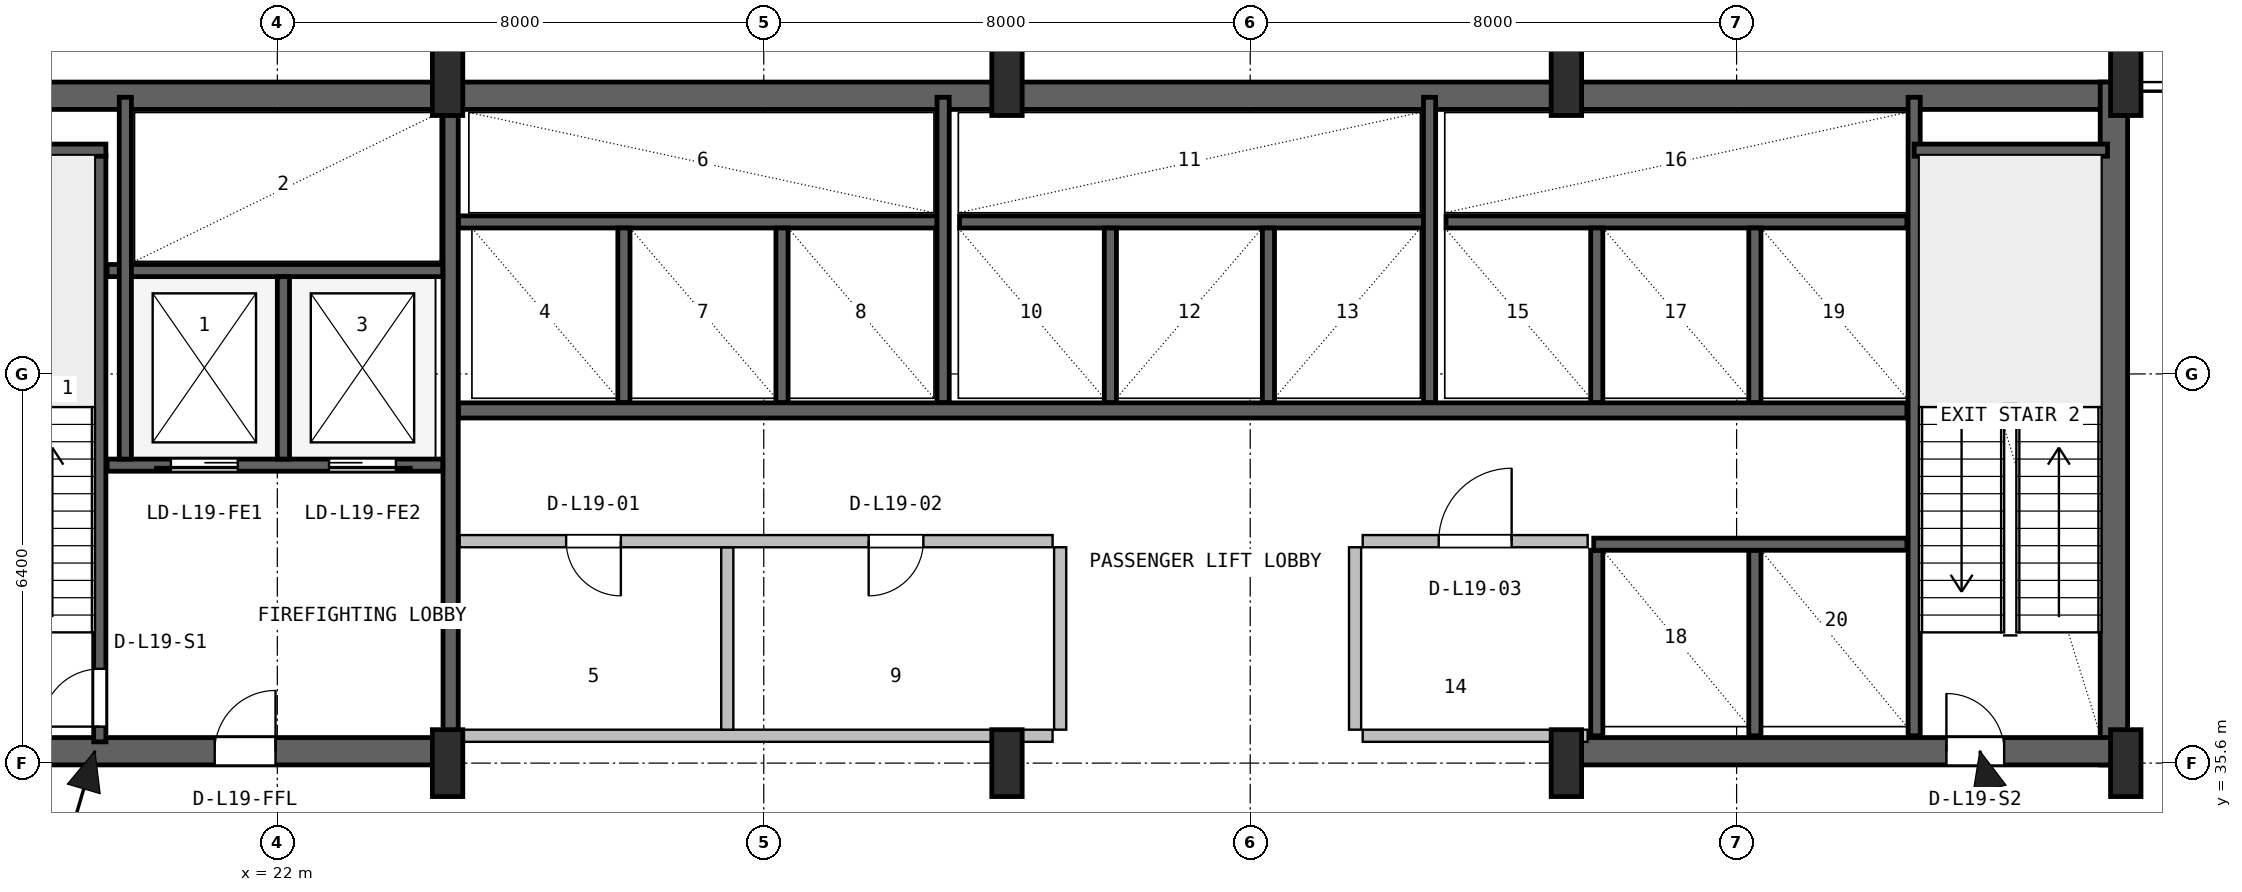
"""IFC4 building model, lengths in metres.
Left out: names, types, materials, properties, quantities, classifications, styles, units other than length and angle.
Written with IfcOpenShell. Run it as: python <this file> out.ifc"""

import sys

from ifc_helpers import new_model, si_unit, direction, frame, frame_2d, origin, origin_2d, place, context, subcontext, project, spatial, rectangle, i_section, extrude, source, transform, mapped, element, fill, save


model = new_model("IFC4")
c1 = context("Model", 3, precision=1e-05, world=origin(), true_north=direction((0.0, 1.0)))
c2 = subcontext(c1, "Body", "Model", "MODEL_VIEW")
j1 = project(units=[si_unit("LENGTHUNIT", "METRE"), si_unit("PLANEANGLEUNIT", "RADIAN")], contexts=[c1])
p1 = place(None, origin())
s1 = spatial("IfcSite", under=j1, at=p1, CompositionType="ELEMENT")
p2 = place(p1, origin())
s2 = spatial("IfcBuilding", under=s1, at=p2, CompositionType="ELEMENT")
p3 = place(p2, frame((0.0, 0.0, 82.2)))
s3 = spatial("IfcBuildingStorey", under=s2, at=p3, CompositionType="ELEMENT", Elevation=82.2)
p4 = place(p3, frame((15.6, 46.575, 0.0), z_axis=(0.0, 0.0, 1.0), x_axis=(1.0, 0.0, 0.0)))
e1 = element("IfcWall", 1, at=p4, inside=s3, PredefinedType="SHEAR", context=c2, shape_type="SweptSolid", body=[
    extrude(rectangle(XDim=36.8, YDim=0.45, at=frame_2d((18.4, 0.0))), origin(), (0.0, 0.0, 1.0), 4.55),
])
p5 = place(p3, frame((52.205, 35.57, 0.0), z_axis=(0.0, 0.0, 1.0), x_axis=(0.0, 1.0, 0.0)))
e2 = element("IfcWall", 2, at=p5, inside=s3, PredefinedType="SHEAR", context=c2, shape_type="SweptSolid", body=[
    extrude(rectangle(XDim=11.23, YDim=0.45, at=frame_2d((5.615, 0.0))), origin(), (0.0, 0.0, 1.0), 4.55),
])
p6 = place(p3, frame((15.57, 35.795, 0.0), z_axis=(0.0, 0.0, 1.0), x_axis=(1.0, 0.0, 0.0)))
e3 = element("IfcWall", 3, at=p6, inside=s3, PredefinedType="SHEAR", context=c2, shape_type="SweptSolid", body=[
    extrude(rectangle(XDim=9.23, YDim=0.45, at=frame_2d((4.615, 0.0))), origin(), (0.0, 0.0, 1.0), 4.55),
])
p7 = place(p6, frame((5.4, 0.0, 0.0)))
e4 = element("IfcOpeningElement", 4, at=p7, cuts=e3, PredefinedType="OPENING", context=c2, shape_type="SweptSolid", body=[
    extrude(rectangle(XDim=1.0, YDim=2.1, at=frame_2d((0.5, 1.05))), frame((0.0, 0.235, 0.0), z_axis=(0.0, -1.0, 0.0), x_axis=(1.0, 0.0, 0.0)), (0.0, 0.0, 1.0), 0.47),
])
p8 = place(p3, frame((43.2, 35.795, 0.0), z_axis=(0.0, 0.0, 1.0), x_axis=(1.0, 0.0, 0.0)))
e5 = element("IfcWall", 5, at=p8, inside=s3, PredefinedType="SHEAR", context=c2, shape_type="SweptSolid", body=[
    extrude(rectangle(XDim=9.23, YDim=0.45, at=frame_2d((4.615, 0.0))), origin(), (0.0, 0.0, 1.0), 4.55),
])
p9 = place(p8, frame((6.25, 0.0, 0.0)))
e6 = element("IfcOpeningElement", 6, at=p9, cuts=e5, PredefinedType="OPENING", context=c2, shape_type="SweptSolid", body=[
    extrude(rectangle(XDim=0.95, YDim=2.1, at=frame_2d((0.475, 1.05))), frame((0.0, 0.235, 0.0), z_axis=(0.0, -1.0, 0.0), x_axis=(1.0, 0.0, 0.0)), (0.0, 0.0, 1.0), 0.47),
])
m1 = source(origin(), c2, "Body", "SweptSolid", [
    extrude(i_section(OverallWidth=0.5, OverallDepth=1.1, WebThickness=0.018, FlangeThickness=0.032, FilletRadius=0.018, at=origin_2d()), origin(), (0.0, 0.0, 1.0), 4.8),
])
for number, where, z_axis, x_axis in (
    (7, (24.8, 35.6, 0.0), (0.0, 0.0, 1.0), (1.0, 0.0, 0.0)),
    (8, (24.8, 46.8, 0.0), (0.0, 0.0, 1.0), (1.0, 0.0, 0.0)),
    (9, (34.0, 35.6, 0.0), (0.0, 0.0, 1.0), (1.0, 0.0, 0.0)),
    (10, (34.0, 46.8, 0.0), (0.0, 0.0, 1.0), (1.0, 0.0, 0.0)),
    (11, (43.2, 35.6, 0.0), (0.0, 0.0, 1.0), (1.0, 0.0, 0.0)),
    (12, (43.2, 46.8, 0.0), (0.0, 0.0, 1.0), (1.0, 0.0, 0.0)),
    (13, (52.4, 35.6, 0.0), (0.0, 0.0, 1.0), (1.0, 0.0, 0.0)),
    (14, (52.4, 46.8, 0.0), (0.0, 0.0, 1.0), (1.0, 0.0, 0.0)),
):
    element("IfcColumn", number, at=place(p3, frame(where, z_axis=z_axis, x_axis=x_axis)), inside=s3, PredefinedType="COLUMN", context=c2, shape_type="MappedRepresentation", body=[
        mapped(m1, transform((0.0, 0.0, 0.0), x_axis=(1.0, 0.0, 0.0), y_axis=(0.0, 1.0, 0.0), z_axis=(0.0, 0.0, 1.0), scale=1.0)),
    ])
p10 = place(p3, frame((19.08, 35.95, 0.0), z_axis=(0.0, 0.0, 1.0), x_axis=(0.0, 1.0, 0.0)))
e15 = element("IfcWall", 15, at=p10, inside=s3, PredefinedType="SHEAR", context=c2, shape_type="SweptSolid", body=[
    extrude(rectangle(XDim=9.65, YDim=0.2, at=frame_2d((4.825, 0.0))), origin(), (0.0, 0.0, 1.0), 4.55),
])
p11 = place(p10, frame((0.25, 0.0, 0.0)))
e16 = element("IfcOpeningElement", 16, at=p11, cuts=e15, PredefinedType="OPENING", context=c2, shape_type="SweptSolid", body=[
    extrude(rectangle(XDim=0.95, YDim=2.1, at=frame_2d((0.475, 1.05))), frame((0.0, 0.11, 0.0), z_axis=(0.0, -1.0, 0.0), x_axis=(1.0, 0.0, 0.0)), (0.0, 0.0, 1.0), 0.22),
])
p12 = place(p3, frame((15.95, 45.68, 0.0), z_axis=(0.0, 0.0, 1.0), x_axis=(1.0, 0.0, 0.0)))
e17 = element("IfcWall", 17, at=p12, inside=s3, PredefinedType="SHEAR", context=c2, shape_type="SweptSolid", body=[
    extrude(rectangle(XDim=3.23, YDim=0.2, at=frame_2d((1.615, 0.0))), origin(), (0.0, 0.0, 1.0), 4.55),
])
p13 = place(p3, frame((24.85, 36.05, 0.0), z_axis=(0.0, 0.0, 1.0), x_axis=(0.0, 1.0, 0.0)))
e18 = element("IfcWall", 18, at=p13, inside=s3, PredefinedType="SHEAR", context=c2, shape_type="SweptSolid", body=[
    extrude(rectangle(XDim=10.45, YDim=0.25, at=frame_2d((5.225, 0.0))), origin(), (0.0, 0.0, 1.0), 4.55),
])
p14 = place(p3, frame((19.2, 40.5, 0.0), z_axis=(0.0, 0.0, 1.0), x_axis=(1.0, 0.0, 0.0)))
e19 = element("IfcWall", 19, at=p14, inside=s3, PredefinedType="SHEAR", context=c2, shape_type="SweptSolid", body=[
    extrude(rectangle(XDim=5.52, YDim=0.2, at=frame_2d((2.76, 0.0))), origin(), (0.0, 0.0, 1.0), 4.55),
])
p15 = place(p14, frame((1.05, 0.0, 0.0)))
e20 = element("IfcOpeningElement", 20, at=p15, cuts=e19, PredefinedType="OPENING", context=c2, shape_type="SweptSolid", body=[
    extrude(rectangle(XDim=1.1, YDim=2.18, at=frame_2d((0.55, 1.09))), frame((0.0, 0.11, 0.0), z_axis=(0.0, -1.0, 0.0), x_axis=(1.0, 0.0, 0.0)), (0.0, 0.0, 1.0), 0.22),
])
p16 = place(p14, frame((3.65, 0.0, 0.0)))
e21 = element("IfcOpeningElement", 21, at=p16, cuts=e19, PredefinedType="OPENING", context=c2, shape_type="SweptSolid", body=[
    extrude(rectangle(XDim=1.1, YDim=2.18, at=frame_2d((0.55, 1.09))), frame((0.0, 0.11, 0.0), z_axis=(0.0, -1.0, 0.0), x_axis=(1.0, 0.0, 0.0)), (0.0, 0.0, 1.0), 0.22),
])
p17 = place(p3, frame((19.2, 43.7, 0.0), z_axis=(0.0, 0.0, 1.0), x_axis=(1.0, 0.0, 0.0)))
e22 = element("IfcWall", 22, at=p17, inside=s3, PredefinedType="SHEAR", context=c2, shape_type="SweptSolid", body=[
    extrude(rectangle(XDim=5.52, YDim=0.2, at=frame_2d((2.76, 0.0))), origin(), (0.0, 0.0, 1.0), 4.55),
])
p18 = place(p3, frame((22.1, 40.6, 0.0), z_axis=(0.0, 0.0, 1.0), x_axis=(0.0, 1.0, 0.0)))
e23 = element("IfcWall", 23, at=p18, inside=s3, PredefinedType="SHEAR", context=c2, shape_type="SweptSolid", body=[
    extrude(rectangle(XDim=3.0, YDim=0.2, at=frame_2d((1.5, 0.0))), origin(), (0.0, 0.0, 1.0), 4.55),
])
p19 = place(p3, frame((19.5, 40.6, 0.0), z_axis=(0.0, 0.0, 1.0), x_axis=(0.0, 1.0, 0.0)))
e24 = element("IfcWall", 24, at=p19, inside=s3, PredefinedType="SHEAR", context=c2, shape_type="SweptSolid", body=[
    extrude(rectangle(XDim=5.95, YDim=0.2, at=frame_2d((2.975, 0.0))), origin(), (0.0, 0.0, 1.0), 4.55),
])
p20 = place(p3, frame((48.92, 36.05, 0.0), z_axis=(0.0, 0.0, 1.0), x_axis=(0.0, 1.0, 0.0)))
e25 = element("IfcWall", 25, at=p20, inside=s3, PredefinedType="SHEAR", context=c2, shape_type="SweptSolid", body=[
    extrude(rectangle(XDim=10.5, YDim=0.2, at=frame_2d((5.25, 0.0))), origin(), (0.0, 0.0, 1.0), 4.55),
])
p21 = place(p3, frame((48.92, 45.68, 0.0), z_axis=(0.0, 0.0, 1.0), x_axis=(1.0, 0.0, 0.0)))
e26 = element("IfcWall", 26, at=p21, inside=s3, PredefinedType="SHEAR", context=c2, shape_type="SweptSolid", body=[
    extrude(rectangle(XDim=3.18, YDim=0.2, at=frame_2d((1.59, 0.0))), origin(), (0.0, 0.0, 1.0), 4.55),
])
p22 = place(p3, frame((24.98, 41.4, 0.0), z_axis=(0.0, 0.0, 1.0), x_axis=(1.0, 0.0, 0.0)))
e27 = element("IfcWall", 27, at=p22, inside=s3, PredefinedType="SHEAR", context=c2, shape_type="SweptSolid", body=[
    extrude(rectangle(XDim=23.82, YDim=0.25, at=frame_2d((11.91, 0.0))), origin(), (0.0, 0.0, 1.0), 4.55),
])
p23 = place(p3, frame((24.98, 44.5, 0.0), z_axis=(0.0, 0.0, 1.0), x_axis=(1.0, 0.0, 0.0)))
e28 = element("IfcWall", 28, at=p23, inside=s3, PredefinedType="SHEAR", context=c2, shape_type="SweptSolid", body=[
    extrude(rectangle(XDim=7.87, YDim=0.2, at=frame_2d((3.935, 0.0))), origin(), (0.0, 0.0, 1.0), 4.55),
])
for number, where, z_axis, x_axis in (
    (29, (27.7, 41.53, 0.0), (0.0, 0.0, 1.0), (0.0, 1.0, 0.0)),
    (30, (30.3, 41.53, 0.0), (0.0, 0.0, 1.0), (0.0, 1.0, 0.0)),
):
    element("IfcWall", number, at=place(p3, frame(where, z_axis=z_axis, x_axis=x_axis)), inside=s3, PredefinedType="SHEAR", context=c2, shape_type="SweptSolid", body=[
        extrude(rectangle(XDim=2.87, YDim=0.2, at=frame_2d((1.435, 0.0))), origin(), (0.0, 0.0, 1.0), 4.55),
    ])
p24 = place(p3, frame((32.95, 41.53, 0.0), z_axis=(0.0, 0.0, 1.0), x_axis=(0.0, 1.0, 0.0)))
e31 = element("IfcWall", 31, at=p24, inside=s3, PredefinedType="SHEAR", context=c2, shape_type="SweptSolid", body=[
    extrude(rectangle(XDim=5.02, YDim=0.2, at=frame_2d((2.51, 0.0))), origin(), (0.0, 0.0, 1.0), 4.55),
])
p25 = place(p3, frame((33.22, 44.5, 0.0), z_axis=(0.0, 0.0, 1.0), x_axis=(1.0, 0.0, 0.0)))
e32 = element("IfcWall", 32, at=p25, inside=s3, PredefinedType="SHEAR", context=c2, shape_type="SweptSolid", body=[
    extrude(rectangle(XDim=7.63, YDim=0.2, at=frame_2d((3.815, 0.0))), origin(), (0.0, 0.0, 1.0), 4.55),
])
for number, where, z_axis, x_axis in (
    (33, (35.7, 41.53, 0.0), (0.0, 0.0, 1.0), (0.0, 1.0, 0.0)),
    (34, (38.3, 41.53, 0.0), (0.0, 0.0, 1.0), (0.0, 1.0, 0.0)),
):
    element("IfcWall", number, at=place(p3, frame(where, z_axis=z_axis, x_axis=x_axis)), inside=s3, PredefinedType="SHEAR", context=c2, shape_type="SweptSolid", body=[
        extrude(rectangle(XDim=2.87, YDim=0.2, at=frame_2d((1.435, 0.0))), origin(), (0.0, 0.0, 1.0), 4.55),
    ])
p26 = place(p3, frame((40.95, 41.53, 0.0), z_axis=(0.0, 0.0, 1.0), x_axis=(0.0, 1.0, 0.0)))
e35 = element("IfcWall", 35, at=p26, inside=s3, PredefinedType="SHEAR", context=c2, shape_type="SweptSolid", body=[
    extrude(rectangle(XDim=5.02, YDim=0.2, at=frame_2d((2.51, 0.0))), origin(), (0.0, 0.0, 1.0), 4.55),
])
p27 = place(p3, frame((41.22, 44.5, 0.0), z_axis=(0.0, 0.0, 1.0), x_axis=(1.0, 0.0, 0.0)))
e36 = element("IfcWall", 36, at=p27, inside=s3, PredefinedType="SHEAR", context=c2, shape_type="SweptSolid", body=[
    extrude(rectangle(XDim=7.58, YDim=0.2, at=frame_2d((3.79, 0.0))), origin(), (0.0, 0.0, 1.0), 4.55),
])
for number, where, z_axis, x_axis in (
    (37, (43.7, 41.53, 0.0), (0.0, 0.0, 1.0), (0.0, 1.0, 0.0)),
    (38, (46.3, 41.53, 0.0), (0.0, 0.0, 1.0), (0.0, 1.0, 0.0)),
):
    element("IfcWall", number, at=place(p3, frame(where, z_axis=z_axis, x_axis=x_axis)), inside=s3, PredefinedType="SHEAR", context=c2, shape_type="SweptSolid", body=[
        extrude(rectangle(XDim=2.87, YDim=0.2, at=frame_2d((1.435, 0.0))), origin(), (0.0, 0.0, 1.0), 4.55),
    ])
for number, where, z_axis, x_axis in (
    (39, (43.7, 36.05, 0.0), (0.0, 0.0, 1.0), (0.0, 1.0, 0.0)),
    (40, (46.3, 36.05, 0.0), (0.0, 0.0, 1.0), (0.0, 1.0, 0.0)),
):
    element("IfcWall", number, at=place(p3, frame(where, z_axis=z_axis, x_axis=x_axis)), inside=s3, PredefinedType="SHEAR", context=c2, shape_type="SweptSolid", body=[
        extrude(rectangle(XDim=3.05, YDim=0.2, at=frame_2d((1.525, 0.0))), origin(), (0.0, 0.0, 1.0), 4.55),
    ])
p28 = place(p3, frame((43.65, 39.2, 0.0), z_axis=(0.0, 0.0, 1.0), x_axis=(1.0, 0.0, 0.0)))
e41 = element("IfcWall", 41, at=p28, inside=s3, PredefinedType="SHEAR", context=c2, shape_type="SweptSolid", body=[
    extrude(rectangle(XDim=5.15, YDim=0.2, at=frame_2d((2.575, 0.0))), origin(), (0.0, 0.0, 1.0), 4.55),
])
p29 = place(p3, frame((25.0, 36.05, 0.0), z_axis=(0.0, 0.0, 1.0), x_axis=(1.0, 0.0, 0.0)))
e42 = element("IfcWall", 42, at=p29, inside=s3, PredefinedType="SOLIDWALL", context=c2, shape_type="SweptSolid", body=[
    extrude(rectangle(XDim=9.75, YDim=0.2, at=frame_2d((4.875, 0.0))), origin(), (0.0, 0.0, 1.0), 4.53),
])
p30 = place(p3, frame((29.4, 36.15, 0.0), z_axis=(0.0, 0.0, 1.0), x_axis=(0.0, 1.0, 0.0)))
e43 = element("IfcWall", 43, at=p30, inside=s3, PredefinedType="SOLIDWALL", context=c2, shape_type="SweptSolid", body=[
    extrude(rectangle(XDim=3.0, YDim=0.2, at=frame_2d((1.5, 0.0))), origin(), (0.0, 0.0, 1.0), 4.53),
])
p31 = place(p3, frame((25.0, 39.25, 0.0), z_axis=(0.0, 0.0, 1.0), x_axis=(1.0, 0.0, 0.0)))
e44 = element("IfcWall", 44, at=p31, inside=s3, PredefinedType="SOLIDWALL", context=c2, shape_type="SweptSolid", body=[
    extrude(rectangle(XDim=9.75, YDim=0.2, at=frame_2d((4.875, 0.0))), origin(), (0.0, 0.0, 1.0), 4.53),
])
p32 = place(p31, frame((1.75, 0.0, 0.0)))
e45 = element("IfcOpeningElement", 45, at=p32, cuts=e44, PredefinedType="OPENING", context=c2, shape_type="SweptSolid", body=[
    extrude(rectangle(XDim=0.9, YDim=2.06, at=frame_2d((0.45, 1.03))), frame((0.0, 0.11, 0.0), z_axis=(0.0, -1.0, 0.0), x_axis=(1.0, 0.0, 0.0)), (0.0, 0.0, 1.0), 0.22),
])
p33 = place(p31, frame((6.725, 0.0, 0.0)))
e46 = element("IfcOpeningElement", 46, at=p33, cuts=e44, PredefinedType="OPENING", context=c2, shape_type="SweptSolid", body=[
    extrude(rectangle(XDim=0.9, YDim=2.06, at=frame_2d((0.45, 1.03))), frame((0.0, 0.11, 0.0), z_axis=(0.0, -1.0, 0.0), x_axis=(1.0, 0.0, 0.0)), (0.0, 0.0, 1.0), 0.22),
])
p34 = place(p3, frame((34.875, 36.15, 0.0), z_axis=(0.0, 0.0, 1.0), x_axis=(0.0, 1.0, 0.0)))
e47 = element("IfcWall", 47, at=p34, inside=s3, PredefinedType="SOLIDWALL", context=c2, shape_type="SweptSolid", body=[
    extrude(rectangle(XDim=3.0, YDim=0.2, at=frame_2d((1.5, 0.0))), origin(), (0.0, 0.0, 1.0), 4.53),
])
p35 = place(p3, frame((39.85, 36.05, 0.0), z_axis=(0.0, 0.0, 1.0), x_axis=(1.0, 0.0, 0.0)))
e48 = element("IfcWall", 48, at=p35, inside=s3, PredefinedType="SOLIDWALL", context=c2, shape_type="SweptSolid", body=[
    extrude(rectangle(XDim=3.7, YDim=0.2, at=frame_2d((1.85, 0.0))), origin(), (0.0, 0.0, 1.0), 4.53),
])
p36 = place(p3, frame((39.85, 39.25, 0.0), z_axis=(0.0, 0.0, 1.0), x_axis=(1.0, 0.0, 0.0)))
e49 = element("IfcWall", 49, at=p36, inside=s3, PredefinedType="SOLIDWALL", context=c2, shape_type="SweptSolid", body=[
    extrude(rectangle(XDim=3.7, YDim=0.2, at=frame_2d((1.85, 0.0))), origin(), (0.0, 0.0, 1.0), 4.53),
])
p37 = place(p36, frame((1.25, 0.0, 0.0)))
e50 = element("IfcOpeningElement", 50, at=p37, cuts=e49, PredefinedType="OPENING", context=c2, shape_type="SweptSolid", body=[
    extrude(rectangle(XDim=1.2, YDim=2.1, at=frame_2d((0.6, 1.05))), frame((0.0, 0.11, 0.0), z_axis=(0.0, -1.0, 0.0), x_axis=(1.0, 0.0, 0.0)), (0.0, 0.0, 1.0), 0.22),
])
p38 = place(p3, frame((39.725, 36.15, 0.0), z_axis=(0.0, 0.0, 1.0), x_axis=(0.0, 1.0, 0.0)))
e51 = element("IfcWall", 51, at=p38, inside=s3, PredefinedType="SOLIDWALL", context=c2, shape_type="SweptSolid", body=[
    extrude(rectangle(XDim=3.0, YDim=0.2, at=frame_2d((1.5, 0.0))), origin(), (0.0, 0.0, 1.0), 4.53),
])
m2 = source(origin(), c2, "Body", "SweptSolid", [
    extrude(rectangle(XDim=0.95, YDim=2.1, at=frame_2d((0.475, 1.05))), frame((0.0, 0.025, 0.0), z_axis=(0.0, -1.0, 0.0), x_axis=(1.0, 0.0, 0.0)), (0.0, 0.0, 1.0), 0.05),
])
p39 = place(p11, origin())
e52 = element("IfcDoor", 52, at=p39, inside=s3, OperationType="SINGLE_SWING_LEFT", PredefinedType="DOOR", context=c2, shape_type="MappedRepresentation", body=[
    mapped(m2, transform((0.0, 0.0, 0.0), x_axis=(1.0, 0.0, 0.0), y_axis=(0.0, 1.0, 0.0), z_axis=(0.0, 0.0, 1.0), scale=1.0)),
])
fill(e16, e52)
m3 = source(origin(), c2, "Body", "SweptSolid", [
    extrude(rectangle(XDim=1.0, YDim=2.1, at=frame_2d((0.5, 1.05))), frame((0.0, 0.025, 0.0), z_axis=(0.0, -1.0, 0.0), x_axis=(1.0, 0.0, 0.0)), (0.0, 0.0, 1.0), 0.05),
])
p40 = place(p7, origin())
e53 = element("IfcDoor", 53, at=p40, inside=s3, OperationType="SINGLE_SWING_RIGHT", PredefinedType="DOOR", context=c2, shape_type="MappedRepresentation", body=[
    mapped(m3, transform((0.0, 0.0, 0.0), x_axis=(1.0, 0.0, 0.0), y_axis=(0.0, 1.0, 0.0), z_axis=(0.0, 0.0, 1.0), scale=1.0)),
])
fill(e4, e53)
m4 = source(origin(), c2, "Body", "SweptSolid", [
    extrude(rectangle(XDim=1.1, YDim=2.18, at=frame_2d((0.55, 1.09))), frame((0.0, 0.025, 0.0), z_axis=(0.0, -1.0, 0.0), x_axis=(1.0, 0.0, 0.0)), (0.0, 0.0, 1.0), 0.05),
])
p41 = place(p15, frame((1.1, 0.0, 0.0), z_axis=(0.0, 0.0, 1.0), x_axis=(-1.0, 0.0, 0.0)))
e54 = element("IfcDoor", 54, at=p41, inside=s3, OperationType="SLIDING_TO_LEFT", PredefinedType="DOOR", context=c2, shape_type="MappedRepresentation", body=[
    mapped(m4, transform((0.0, 0.0, 0.0), x_axis=(1.0, 0.0, 0.0), y_axis=(0.0, 1.0, 0.0), z_axis=(0.0, 0.0, 1.0), scale=1.0)),
])
fill(e20, e54)
p42 = place(p16, frame((1.1, 0.0, 0.0), z_axis=(0.0, 0.0, 1.0), x_axis=(-1.0, 0.0, 0.0)))
e55 = element("IfcDoor", 55, at=p42, inside=s3, OperationType="SLIDING_TO_RIGHT", PredefinedType="DOOR", context=c2, shape_type="MappedRepresentation", body=[
    mapped(m4, transform((0.0, 0.0, 0.0), x_axis=(1.0, 0.0, 0.0), y_axis=(0.0, 1.0, 0.0), z_axis=(0.0, 0.0, 1.0), scale=1.0)),
])
fill(e21, e55)
p43 = place(p9, origin())
e56 = element("IfcDoor", 56, at=p43, inside=s3, OperationType="SINGLE_SWING_LEFT", PredefinedType="DOOR", context=c2, shape_type="MappedRepresentation", body=[
    mapped(m2, transform((0.0, 0.0, 0.0), x_axis=(1.0, 0.0, 0.0), y_axis=(0.0, 1.0, 0.0), z_axis=(0.0, 0.0, 1.0), scale=1.0)),
])
fill(e6, e56)
m5 = source(origin(), c2, "Body", "SweptSolid", [
    extrude(rectangle(XDim=0.9, YDim=2.06, at=frame_2d((0.45, 1.03))), frame((0.0, 0.025, 0.0), z_axis=(0.0, -1.0, 0.0), x_axis=(1.0, 0.0, 0.0)), (0.0, 0.0, 1.0), 0.05),
])
p44 = place(p32, frame((0.9, 0.0, 0.0), z_axis=(0.0, 0.0, 1.0), x_axis=(-1.0, 0.0, 0.0)))
e57 = element("IfcDoor", 57, at=p44, inside=s3, OperationType="SINGLE_SWING_RIGHT", PredefinedType="DOOR", context=c2, shape_type="MappedRepresentation", body=[
    mapped(m5, transform((0.0, 0.0, 0.0), x_axis=(1.0, 0.0, 0.0), y_axis=(0.0, 1.0, 0.0), z_axis=(0.0, 0.0, 1.0), scale=1.0)),
])
fill(e45, e57)
p45 = place(p33, frame((0.9, 0.0, 0.0), z_axis=(0.0, 0.0, 1.0), x_axis=(-1.0, 0.0, 0.0)))
e58 = element("IfcDoor", 58, at=p45, inside=s3, OperationType="SINGLE_SWING_LEFT", PredefinedType="DOOR", context=c2, shape_type="MappedRepresentation", body=[
    mapped(m5, transform((0.0, 0.0, 0.0), x_axis=(1.0, 0.0, 0.0), y_axis=(0.0, 1.0, 0.0), z_axis=(0.0, 0.0, 1.0), scale=1.0)),
])
fill(e46, e58)
m6 = source(origin(), c2, "Body", "SweptSolid", [
    extrude(rectangle(XDim=1.2, YDim=2.1, at=frame_2d((0.6, 1.05))), frame((0.0, 0.025, 0.0), z_axis=(0.0, -1.0, 0.0), x_axis=(1.0, 0.0, 0.0)), (0.0, 0.0, 1.0), 0.05),
])
p46 = place(p37, origin())
e59 = element("IfcDoor", 59, at=p46, inside=s3, OperationType="SINGLE_SWING_RIGHT", PredefinedType="DOOR", context=c2, shape_type="MappedRepresentation", body=[
    mapped(m6, transform((0.0, 0.0, 0.0), x_axis=(1.0, 0.0, 0.0), y_axis=(0.0, 1.0, 0.0), z_axis=(0.0, 0.0, 1.0), scale=1.0)),
])
fill(e50, e59)
save(model, sys.argv[1])
